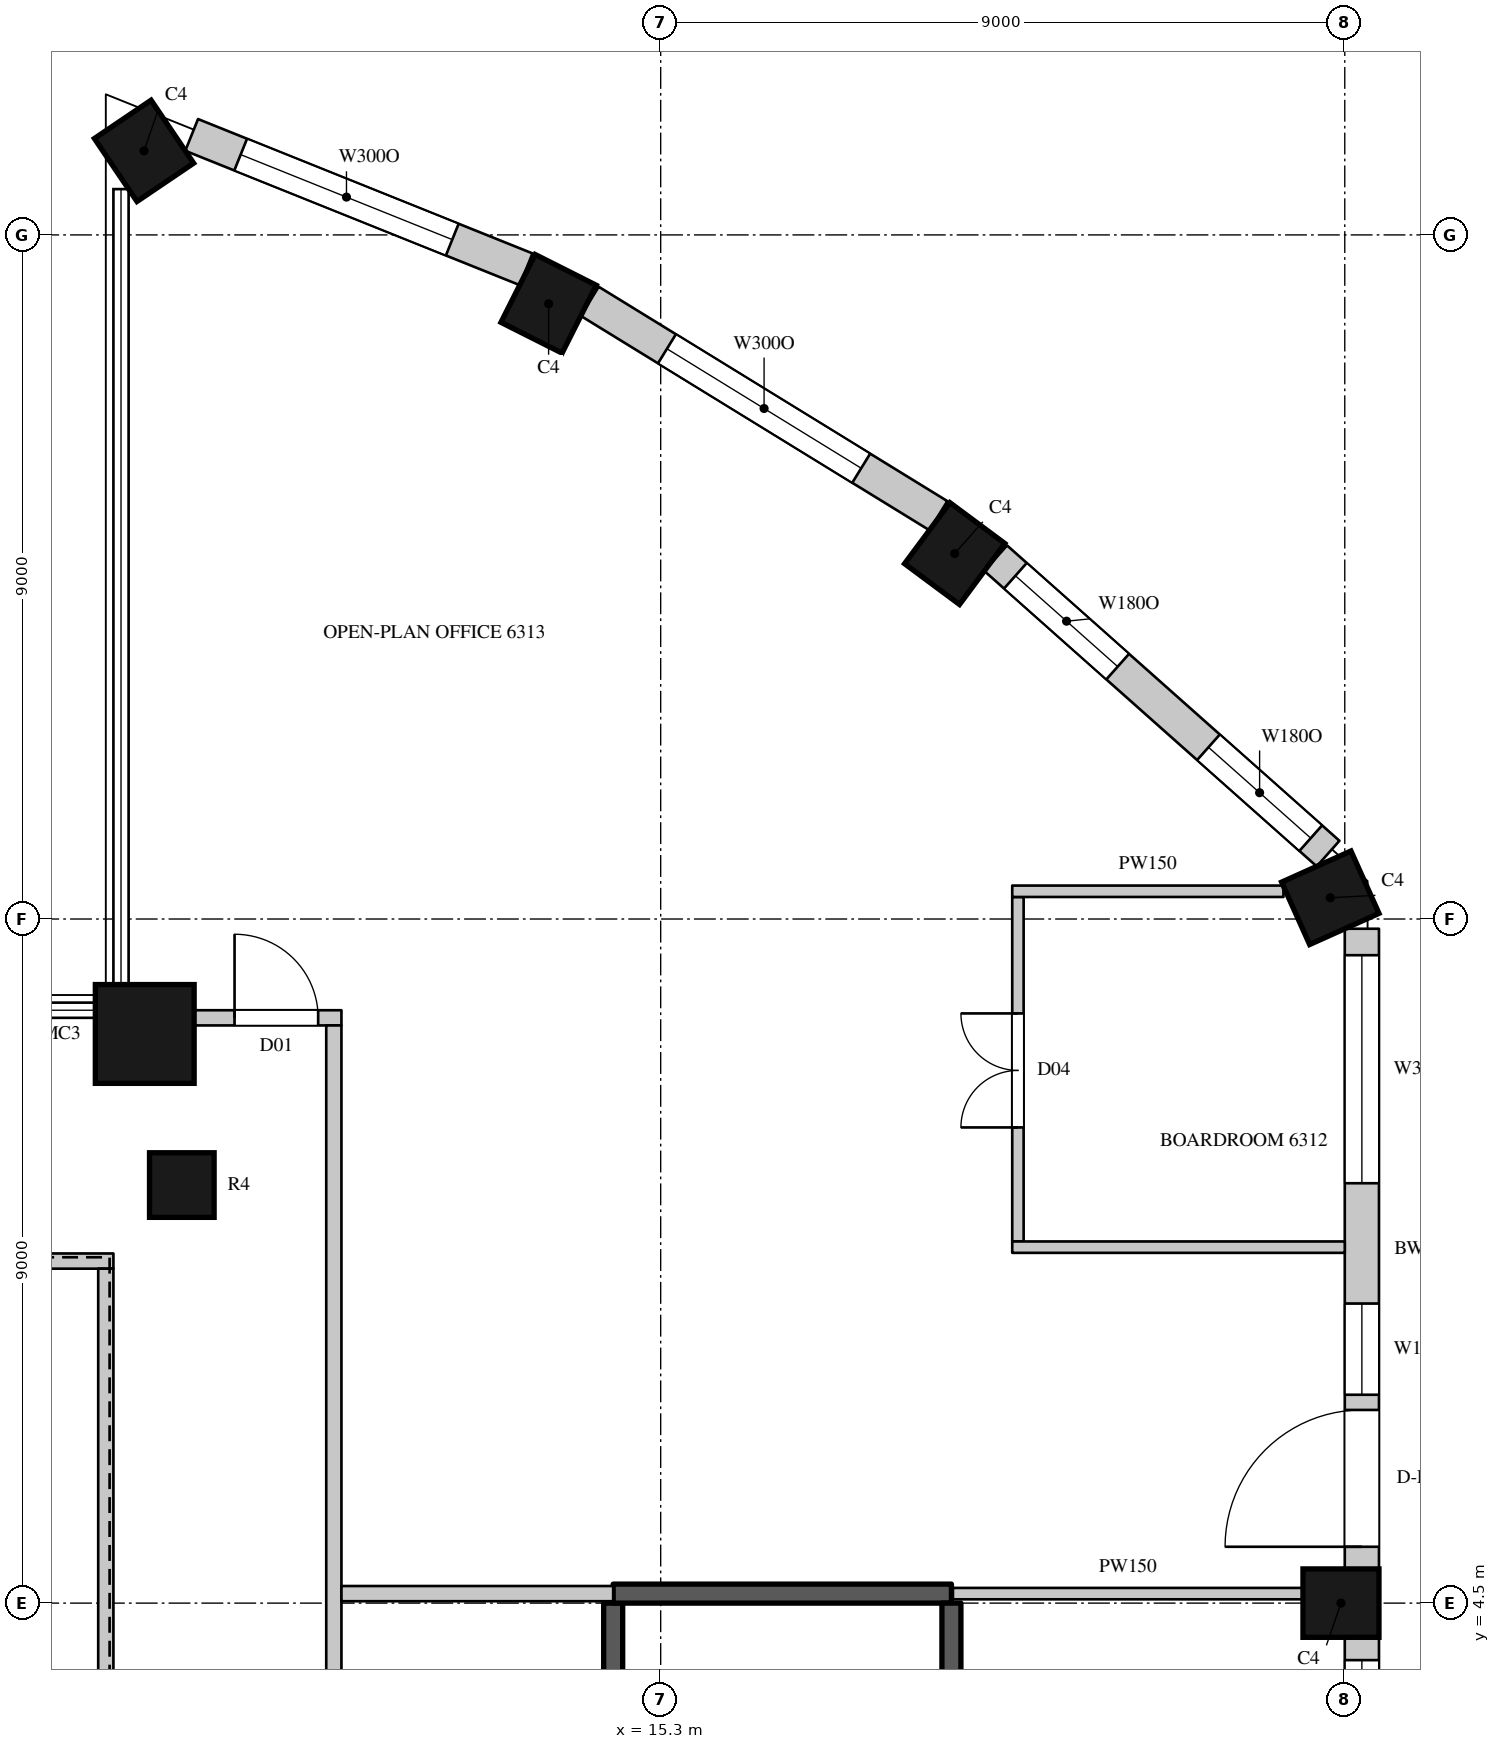
"""IFC4 building model, lengths in metres.
Left out: names, types, materials, properties, quantities, classifications, styles, units other than length and angle.
Written with IfcOpenShell. Run it as: python <this file> out.ifc"""

import sys

from ifc_helpers import new_model, si_unit, direction, frame, frame_2d, origin, origin_2d, place, context, subcontext, project, spatial, rectangle, circle, extrude, element, fill, save


model = new_model("IFC4")
c1 = context("Model", 3, precision=1e-05, world=origin(), true_north=direction((0.0, 1.0)))
c2 = subcontext(c1, "Body", "Model", "MODEL_VIEW")
j1 = project(units=[si_unit("LENGTHUNIT", "METRE"), si_unit("PLANEANGLEUNIT", "RADIAN")], contexts=[c1])
p1 = place(None, origin())
s1 = spatial("IfcSite", under=j1, at=p1, CompositionType="ELEMENT")
p2 = place(p1, origin())
s2 = spatial("IfcBuilding", under=s1, at=p2, CompositionType="ELEMENT")
p3 = place(p2, frame((0.0, 0.0, 280.3)))
s3 = spatial("IfcBuildingStorey", under=s2, at=p3, CompositionType="ELEMENT", Elevation=280.3)
p4 = place(p3, frame((8.503, 23.606, 0.0), z_axis=(0.0, 0.0, 1.0), x_axis=(-0.828469606019, -0.560034027451, 0.0)))
e1 = element("IfcColumn", 1, at=p4, inside=s3, PredefinedType="COLUMN", context=c2, shape_type="SweptSolid", body=[
    extrude(rectangle(XDim=0.9, YDim=1.0, at=origin_2d()), origin(), (0.0, 0.0, 1.0), 4.1),
])
p5 = place(p3, frame((8.512, 11.988, 0.0), z_axis=(0.0, 0.0, 1.0), x_axis=(1.0, 0.0, 0.0)))
e2 = element("IfcColumn", 2, at=p5, inside=s3, PredefinedType="COLUMN", context=c2, shape_type="SweptSolid", body=[
    extrude(circle(Radius=0.65, at=origin_2d()), origin(), (0.0, 0.0, 1.0), 4.1),
])
for number, where, z_axis, x_axis in (
    (3, (24.25, 4.5, 0.0), (0.0, 0.0, 1.0), (0.0, 1.0, 0.0)),
    (4, (24.11, 13.78, 0.0), (0.0, 0.0, 1.0), (-0.41, 0.912, 0.0)),
    (5, (19.168, 18.308, 0.0), (0.0, 0.0, 1.0), (-0.803, 0.596, 0.0)),
    (6, (13.826, 21.594, 0.0), (0.0, 0.0, 1.0), (-0.893, 0.45, 0.0)),
):
    element("IfcColumn", number, at=place(p3, frame(where, z_axis=z_axis, x_axis=x_axis)), inside=s3, PredefinedType="COLUMN", context=c2, shape_type="SweptSolid", body=[
        extrude(rectangle(XDim=0.9, YDim=1.0, at=origin_2d()), origin(), (0.0, 0.0, 1.0), 4.1),
    ])
p6 = place(p3, frame((9.0, 10.0, 0.0), z_axis=(0.0, 0.0, 1.0), x_axis=(1.0, 0.0, 0.0)))
e7 = element("IfcColumn", 7, at=p6, inside=s3, PredefinedType="COLUMN", context=c2, shape_type="SweptSolid", body=[
    extrude(circle(Radius=0.425, at=origin_2d()), origin(), (0.0, 0.0, 1.0), 4.1),
])
p7 = place(p3, frame((24.525, -4.05, 0.0), z_axis=(0.0, 0.0, 1.0), x_axis=(0.0, 1.0, 0.0)))
e8 = element("IfcWall", 8, at=p7, inside=s3, PredefinedType="SOLIDWALL", context=c2, shape_type="SweptSolid", body=[
    extrude(rectangle(XDim=8.1, YDim=0.45, at=frame_2d((4.05, 0.0))), origin(), (0.0, 0.0, 1.0), 3.8),
])
p8 = place(p7, frame((0.3, 0.0, 1.05)))
e9 = element("IfcOpeningElement", 9, at=p8, cuts=e8, PredefinedType="OPENING", context=c2, shape_type="SweptSolid", body=[
    extrude(rectangle(XDim=3.0, YDim=2.4, at=frame_2d((1.5, 1.2))), frame((0.0, 0.235, 0.0), z_axis=(0.0, -1.0, 0.0), x_axis=(1.0, 0.0, 0.0)), (0.0, 0.0, 1.0), 0.47),
])
p9 = place(p7, frame((4.8, 0.0, 1.05)))
e10 = element("IfcOpeningElement", 10, at=p9, cuts=e8, PredefinedType="OPENING", context=c2, shape_type="SweptSolid", body=[
    extrude(rectangle(XDim=3.0, YDim=2.4, at=frame_2d((1.5, 1.2))), frame((0.0, 0.235, 0.0), z_axis=(0.0, -1.0, 0.0), x_axis=(1.0, 0.0, 0.0)), (0.0, 0.0, 1.0), 0.47),
])
p10 = place(p3, frame((24.525, 4.95, 0.0), z_axis=(0.0, 0.0, 1.0), x_axis=(0.0, 1.0, 0.0)))
e11 = element("IfcWall", 11, at=p10, inside=s3, PredefinedType="SOLIDWALL", context=c2, shape_type="SweptSolid", body=[
    extrude(rectangle(XDim=8.422, YDim=0.45, at=frame_2d((4.211, 0.0))), origin(), (0.0, 0.0, 1.0), 3.8),
])
p11 = place(p10, frame((0.291, 0.0, 0.0)))
e12 = element("IfcOpeningElement", 12, at=p11, cuts=e11, PredefinedType="OPENING", context=c2, shape_type="SweptSolid", body=[
    extrude(rectangle(XDim=1.8, YDim=2.4, at=frame_2d((0.9, 1.2))), frame((0.0, 0.235, 0.0), z_axis=(0.0, -1.0, 0.0), x_axis=(1.0, 0.0, 0.0)), (0.0, 0.0, 1.0), 0.47),
])
p12 = place(p10, frame((2.291, 0.0, 1.05)))
e13 = element("IfcOpeningElement", 13, at=p12, cuts=e11, PredefinedType="OPENING", context=c2, shape_type="SweptSolid", body=[
    extrude(rectangle(XDim=1.2, YDim=2.4, at=frame_2d((0.6, 1.2))), frame((0.0, 0.235, 0.0), z_axis=(0.0, -1.0, 0.0), x_axis=(1.0, 0.0, 0.0)), (0.0, 0.0, 1.0), 0.47),
])
p13 = place(p10, frame((5.074, 0.0, 1.05)))
e14 = element("IfcOpeningElement", 14, at=p13, cuts=e11, PredefinedType="OPENING", context=c2, shape_type="SweptSolid", body=[
    extrude(rectangle(XDim=3.0, YDim=2.4, at=frame_2d((1.5, 1.2))), frame((0.0, 0.235, 0.0), z_axis=(0.0, -1.0, 0.0), x_axis=(1.0, 0.0, 0.0)), (0.0, 0.0, 1.0), 0.47),
])
p14 = place(p3, frame((24.081, 14.361, 0.0), z_axis=(0.0, 0.0, 1.0), x_axis=(-0.747570482973, 0.664182484704, 0.0)))
e15 = element("IfcWall", 15, at=p14, inside=s3, PredefinedType="SOLIDWALL", context=c2, shape_type="SweptSolid", body=[
    extrude(rectangle(XDim=5.85, YDim=0.45, at=frame_2d((2.925, 0.0))), origin(), (0.0, 0.0, 1.0), 3.8),
])
p15 = place(p14, frame((0.305, 0.0, 1.05)))
e16 = element("IfcOpeningElement", 16, at=p15, cuts=e15, PredefinedType="OPENING", context=c2, shape_type="SweptSolid", body=[
    extrude(rectangle(XDim=1.8, YDim=2.4, at=frame_2d((0.9, 1.2))), frame((0.0, 0.235, 0.0), z_axis=(0.0, -1.0, 0.0), x_axis=(1.0, 0.0, 0.0)), (0.0, 0.0, 1.0), 0.47),
])
p16 = place(p14, frame((3.703, 0.0, 1.05)))
e17 = element("IfcOpeningElement", 17, at=p16, cuts=e15, PredefinedType="OPENING", context=c2, shape_type="SweptSolid", body=[
    extrude(rectangle(XDim=1.8, YDim=2.4, at=frame_2d((0.9, 1.2))), frame((0.0, 0.235, 0.0), z_axis=(0.0, -1.0, 0.0), x_axis=(1.0, 0.0, 0.0)), (0.0, 0.0, 1.0), 0.47),
])
p17 = place(p3, frame((18.953, 18.806, 0.0), z_axis=(0.0, 0.0, 1.0), x_axis=(-0.851860664503, 0.523768468193, 0.0)))
e18 = element("IfcWall", 18, at=p17, inside=s3, PredefinedType="SOLIDWALL", context=c2, shape_type="SweptSolid", body=[
    extrude(rectangle(XDim=5.384, YDim=0.45, at=frame_2d((2.692, 0.0))), origin(), (0.0, 0.0, 1.0), 3.8),
])
p18 = place(p17, frame((1.192, 0.0, 1.05)))
e19 = element("IfcOpeningElement", 19, at=p18, cuts=e18, PredefinedType="OPENING", context=c2, shape_type="SweptSolid", body=[
    extrude(rectangle(XDim=3.0, YDim=2.4, at=frame_2d((1.5, 1.2))), frame((0.0, 0.235, 0.0), z_axis=(0.0, -1.0, 0.0), x_axis=(1.0, 0.0, 0.0)), (0.0, 0.0, 1.0), 0.47),
])
p19 = place(p3, frame((13.529, 22.048, 0.0), z_axis=(0.0, 0.0, 1.0), x_axis=(-0.927957332619, 0.372686448424, 0.0)))
e20 = element("IfcWall", 20, at=p19, inside=s3, PredefinedType="SOLIDWALL", context=c2, shape_type="SweptSolid", body=[
    extrude(rectangle(XDim=4.741, YDim=0.45, at=frame_2d((2.371, 0.0))), origin(), (0.0, 0.0, 1.0), 3.8),
])
p20 = place(p19, frame((1.047, 0.0, 1.05)))
e21 = element("IfcOpeningElement", 21, at=p20, cuts=e20, PredefinedType="OPENING", context=c2, shape_type="SweptSolid", body=[
    extrude(rectangle(XDim=3.0, YDim=2.4, at=frame_2d((1.5, 1.2))), frame((0.0, 0.235, 0.0), z_axis=(0.0, -1.0, 0.0), x_axis=(1.0, 0.0, 0.0)), (0.0, 0.0, 1.0), 0.47),
])
p21 = place(p3, frame((-2.48, 9.0, 0.0), z_axis=(0.0, 0.0, 1.0), x_axis=(1.0, 0.0, 0.0)))
e22 = element("IfcWall", 22, at=p21, inside=s3, PredefinedType="PARTITIONING", context=c2, shape_type="SweptSolid", body=[
    extrude(rectangle(XDim=10.58, YDim=0.2, at=frame_2d((5.29, 0.0))), origin(), (0.0, 0.0, 1.0), 3.8),
])
p22 = place(p3, frame((8.0, -8.9, 0.0), z_axis=(0.0, 0.0, 1.0), x_axis=(0.0, 1.0, 0.0)))
e23 = element("IfcWall", 23, at=p22, inside=s3, PredefinedType="PARTITIONING", context=c2, shape_type="SweptSolid", body=[
    extrude(rectangle(XDim=17.8, YDim=0.2, at=frame_2d((8.9, 0.0))), origin(), (0.0, 0.0, 1.0), 3.8),
])
p23 = place(p3, frame((9.144, 12.2, 0.0), z_axis=(0.0, 0.0, 1.0), x_axis=(1.0, 0.0, 0.0)))
e24 = element("IfcWall", 24, at=p23, inside=s3, PredefinedType="PARTITIONING", context=c2, shape_type="SweptSolid", body=[
    extrude(rectangle(XDim=1.956, YDim=0.2, at=frame_2d((0.978, 0.0))), origin(), (0.0, 0.0, 1.0), 3.8),
])
p24 = place(p23, frame((0.55, 0.0, 0.0)))
e25 = element("IfcOpeningElement", 25, at=p24, cuts=e24, PredefinedType="OPENING", context=c2, shape_type="SweptSolid", body=[
    extrude(rectangle(XDim=1.1, YDim=2.4, at=frame_2d((0.55, 1.2))), frame((0.0, 0.11, 0.0), z_axis=(0.0, -1.0, 0.0), x_axis=(1.0, 0.0, 0.0)), (0.0, 0.0, 1.0), 0.22),
])
p25 = place(p3, frame((11.0, -12.0, 0.0), z_axis=(0.0, 0.0, 1.0), x_axis=(0.0, 1.0, 0.0)))
e26 = element("IfcWall", 26, at=p25, inside=s3, PredefinedType="PARTITIONING", context=c2, shape_type="SweptSolid", body=[
    extrude(rectangle(XDim=24.1, YDim=0.2, at=frame_2d((12.05, 0.0))), origin(), (0.0, 0.0, 1.0), 3.8),
])
p26 = place(p25, frame((9.85, 0.0, 0.0)))
e27 = element("IfcOpeningElement", 27, at=p26, cuts=e26, PredefinedType="OPENING", context=c2, shape_type="SweptSolid", body=[
    extrude(rectangle(XDim=1.5, YDim=2.4, at=frame_2d((0.75, 1.2))), frame((0.0, 0.11, 0.0), z_axis=(0.0, -1.0, 0.0), x_axis=(1.0, 0.0, 0.0)), (0.0, 0.0, 1.0), 0.22),
])
p27 = place(p25, frame((4.55, 0.0, 0.0)))
e28 = element("IfcOpeningElement", 28, at=p27, cuts=e26, PredefinedType="OPENING", context=c2, shape_type="SweptSolid", body=[
    extrude(rectangle(XDim=1.1, YDim=2.4, at=frame_2d((0.55, 1.2))), frame((0.0, 0.11, 0.0), z_axis=(0.0, -1.0, 0.0), x_axis=(1.0, 0.0, 0.0)), (0.0, 0.0, 1.0), 0.22),
])
p28 = place(p3, frame((11.1, 4.625, 0.0), z_axis=(0.0, 0.0, 1.0), x_axis=(1.0, 0.0, 0.0)))
e29 = element("IfcWall", 29, at=p28, inside=s3, PredefinedType="PARTITIONING", context=c2, shape_type="SweptSolid", body=[
    extrude(rectangle(XDim=3.575, YDim=0.2, at=frame_2d((1.788, 0.0))), origin(), (0.0, 0.0, 1.0), 3.8),
])
p29 = place(p3, frame((19.145, 4.625, 0.0), z_axis=(0.0, 0.0, 1.0), x_axis=(1.0, 0.0, 0.0)))
e30 = element("IfcWall", 30, at=p29, inside=s3, PredefinedType="PARTITIONING", context=c2, shape_type="SweptSolid", body=[
    extrude(rectangle(XDim=4.605, YDim=0.15, at=frame_2d((2.302, 0.0))), origin(), (0.0, 0.0, 1.0), 3.8),
])
p30 = place(p3, frame((20.0, 9.258, 0.0), z_axis=(0.0, 0.0, 1.0), x_axis=(0.0, 1.0, 0.0)))
e31 = element("IfcWall", 31, at=p30, inside=s3, PredefinedType="PARTITIONING", context=c2, shape_type="SweptSolid", body=[
    extrude(rectangle(XDim=4.532, YDim=0.15, at=frame_2d((2.266, 0.0))), origin(), (0.0, 0.0, 1.0), 3.8),
])
p31 = place(p30, frame((1.5, 0.0, 0.0)))
e32 = element("IfcOpeningElement", 32, at=p31, cuts=e31, PredefinedType="OPENING", context=c2, shape_type="SweptSolid", body=[
    extrude(rectangle(XDim=1.5, YDim=2.2, at=frame_2d((0.75, 1.1))), frame((0.0, 0.085, 0.0), z_axis=(0.0, -1.0, 0.0), x_axis=(1.0, 0.0, 0.0)), (0.0, 0.0, 1.0), 0.17),
])
p32 = place(p3, frame((19.925, 9.183, 0.0), z_axis=(0.0, 0.0, 1.0), x_axis=(1.0, 0.0, 0.0)))
e33 = element("IfcWall", 33, at=p32, inside=s3, PredefinedType="PARTITIONING", context=c2, shape_type="SweptSolid", body=[
    extrude(rectangle(XDim=4.375, YDim=0.15, at=frame_2d((2.188, 0.0))), origin(), (0.0, 0.0, 1.0), 3.15),
])
p33 = place(p3, frame((19.925, 13.865, 0.0), z_axis=(0.0, 0.0, 1.0), x_axis=(1.0, 0.0, 0.0)))
e34 = element("IfcWall", 34, at=p33, inside=s3, PredefinedType="PARTITIONING", context=c2, shape_type="SweptSolid", body=[
    extrude(rectangle(XDim=3.568, YDim=0.15, at=frame_2d((1.784, 0.0))), origin(), (0.0, 0.0, 1.0), 3.8),
])
p34 = place(p3, frame((14.675, -4.5, 0.0), z_axis=(0.0, 0.0, 1.0), x_axis=(0.0, 1.0, 0.0)))
e35 = element("IfcWall", 35, at=p34, inside=s3, PredefinedType="SHEAR", context=c2, shape_type="SweptSolid", body=[
    extrude(rectangle(XDim=9.0, YDim=0.25, at=frame_2d((4.5, 0.0))), origin(), (0.0, 0.0, 1.0), 3.8),
])
p35 = place(p34, frame((0.45, 0.0, 0.0)))
e36 = element("IfcOpeningElement", 36, at=p35, cuts=e35, PredefinedType="OPENING", context=c2, shape_type="SweptSolid", body=[
    extrude(rectangle(XDim=1.1, YDim=2.2, at=frame_2d((0.55, 1.1))), frame((0.0, 0.135, 0.0), z_axis=(0.0, -1.0, 0.0), x_axis=(1.0, 0.0, 0.0)), (0.0, 0.0, 1.0), 0.27),
])
p36 = place(p3, frame((14.675, 4.625, 0.0), z_axis=(0.0, 0.0, 1.0), x_axis=(1.0, 0.0, 0.0)))
e37 = element("IfcWall", 37, at=p36, inside=s3, PredefinedType="SHEAR", context=c2, shape_type="SweptSolid", body=[
    extrude(rectangle(XDim=4.45, YDim=0.25, at=frame_2d((2.225, 0.0))), origin(), (0.0, 0.0, 1.0), 3.8),
])
p37 = place(p3, frame((19.125, -4.5, 0.0), z_axis=(0.0, 0.0, 1.0), x_axis=(0.0, 1.0, 0.0)))
e38 = element("IfcWall", 38, at=p37, inside=s3, PredefinedType="SHEAR", context=c2, shape_type="SweptSolid", body=[
    extrude(rectangle(XDim=9.0, YDim=0.25, at=frame_2d((4.5, 0.0))), origin(), (0.0, 0.0, 1.0), 3.8),
])
p38 = place(p9, origin())
e39 = element("IfcWindow", 39, at=p38, inside=s3, PartitioningType="SINGLE_PANEL", PredefinedType="WINDOW", context=c2, shape_type="SweptSolid", body=[
    extrude(rectangle(XDim=3.0, YDim=2.4, at=frame_2d((1.5, 1.2))), frame((0.0, 0.135, 0.0), z_axis=(0.0, -1.0, 0.0), x_axis=(1.0, 0.0, 0.0)), (0.0, 0.0, 1.0), 0.06),
])
fill(e10, e39)
p39 = place(p11, origin())
e40 = element("IfcDoor", 40, at=p39, inside=s3, OperationType="SLIDING_TO_LEFT", PredefinedType="DOOR", context=c2, shape_type="SweptSolid", body=[
    extrude(rectangle(XDim=1.8, YDim=2.4, at=frame_2d((0.9, 1.2))), frame((0.0, 0.13, 0.0), z_axis=(0.0, -1.0, 0.0), x_axis=(1.0, 0.0, 0.0)), (0.0, 0.0, 1.0), 0.05),
])
fill(e12, e40)
p40 = place(p12, origin())
e41 = element("IfcWindow", 41, at=p40, inside=s3, PartitioningType="SINGLE_PANEL", PredefinedType="WINDOW", context=c2, shape_type="SweptSolid", body=[
    extrude(rectangle(XDim=1.2, YDim=2.4, at=frame_2d((0.6, 1.2))), frame((0.0, 0.135, 0.0), z_axis=(0.0, -1.0, 0.0), x_axis=(1.0, 0.0, 0.0)), (0.0, 0.0, 1.0), 0.06),
])
fill(e13, e41)
p41 = place(p13, origin())
e42 = element("IfcWindow", 42, at=p41, inside=s3, PartitioningType="SINGLE_PANEL", PredefinedType="WINDOW", context=c2, shape_type="SweptSolid", body=[
    extrude(rectangle(XDim=3.0, YDim=2.4, at=frame_2d((1.5, 1.2))), frame((0.0, 0.135, 0.0), z_axis=(0.0, -1.0, 0.0), x_axis=(1.0, 0.0, 0.0)), (0.0, 0.0, 1.0), 0.06),
])
fill(e14, e42)
p42 = place(p15, origin())
e43 = element("IfcWindow", 43, at=p42, inside=s3, PartitioningType="SINGLE_PANEL", PredefinedType="WINDOW", context=c2, shape_type="SweptSolid", body=[
    extrude(rectangle(XDim=1.8, YDim=2.4, at=frame_2d((0.9, 1.2))), frame((0.0, 0.135, 0.0), z_axis=(0.0, -1.0, 0.0), x_axis=(1.0, 0.0, 0.0)), (0.0, 0.0, 1.0), 0.06),
])
fill(e16, e43)
p43 = place(p16, origin())
e44 = element("IfcWindow", 44, at=p43, inside=s3, PartitioningType="SINGLE_PANEL", PredefinedType="WINDOW", context=c2, shape_type="SweptSolid", body=[
    extrude(rectangle(XDim=1.8, YDim=2.4, at=frame_2d((0.9, 1.2))), frame((0.0, 0.135, 0.0), z_axis=(0.0, -1.0, 0.0), x_axis=(1.0, 0.0, 0.0)), (0.0, 0.0, 1.0), 0.06),
])
fill(e17, e44)
p44 = place(p18, origin())
e45 = element("IfcWindow", 45, at=p44, inside=s3, PartitioningType="SINGLE_PANEL", PredefinedType="WINDOW", context=c2, shape_type="SweptSolid", body=[
    extrude(rectangle(XDim=3.0, YDim=2.4, at=frame_2d((1.5, 1.2))), frame((0.0, 0.135, 0.0), z_axis=(0.0, -1.0, 0.0), x_axis=(1.0, 0.0, 0.0)), (0.0, 0.0, 1.0), 0.06),
])
fill(e19, e45)
p45 = place(p20, origin())
e46 = element("IfcWindow", 46, at=p45, inside=s3, PartitioningType="SINGLE_PANEL", PredefinedType="WINDOW", context=c2, shape_type="SweptSolid", body=[
    extrude(rectangle(XDim=3.0, YDim=2.4, at=frame_2d((1.5, 1.2))), frame((0.0, 0.135, 0.0), z_axis=(0.0, -1.0, 0.0), x_axis=(1.0, 0.0, 0.0)), (0.0, 0.0, 1.0), 0.06),
])
fill(e21, e46)
p46 = place(p24, origin())
e47 = element("IfcDoor", 47, at=p46, inside=s3, OperationType="SINGLE_SWING_LEFT", PredefinedType="DOOR", context=c2, shape_type="SweptSolid", body=[
    extrude(rectangle(XDim=1.1, YDim=2.4, at=frame_2d((0.55, 1.2))), frame((0.0, 0.025, 0.0), z_axis=(0.0, -1.0, 0.0), x_axis=(1.0, 0.0, 0.0)), (0.0, 0.0, 1.0), 0.05),
])
fill(e25, e47)
p47 = place(p31, origin())
e48 = element("IfcDoor", 48, at=p47, inside=s3, OperationType="DOUBLE_DOOR_SINGLE_SWING", PredefinedType="DOOR", context=c2, shape_type="SweptSolid", body=[
    extrude(rectangle(XDim=1.5, YDim=2.2, at=frame_2d((0.75, 1.1))), frame((0.0, 0.025, 0.0), z_axis=(0.0, -1.0, 0.0), x_axis=(1.0, 0.0, 0.0)), (0.0, 0.0, 1.0), 0.05),
])
fill(e32, e48)
save(model, sys.argv[1])
